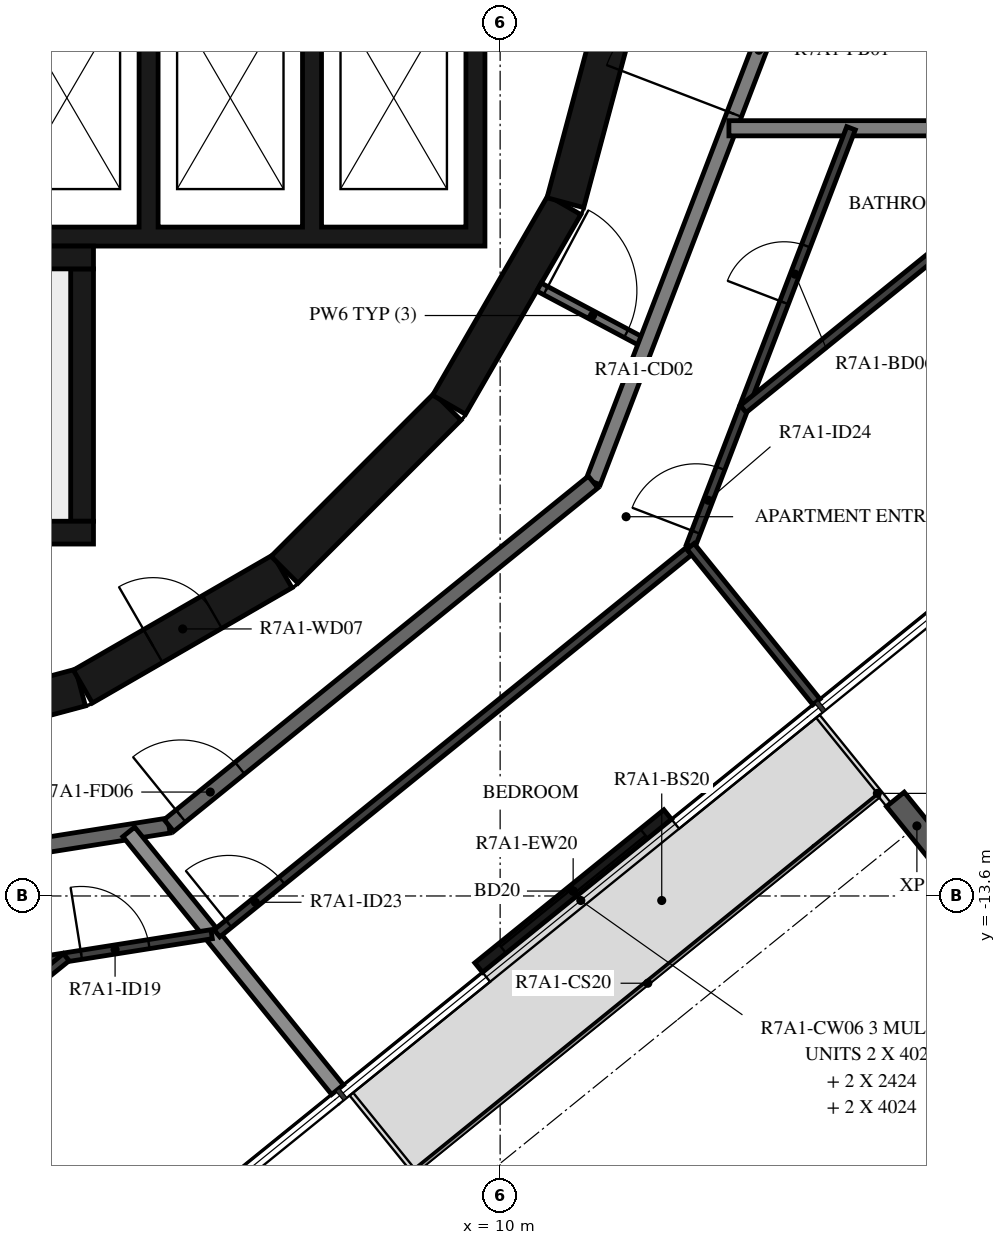
"""IFC4 building model, lengths in metres.
Left out: names, types, materials, properties, quantities, classifications, styles, units other than length and angle.
Written with IfcOpenShell. Run it as: python <this file> out.ifc"""

import sys

from ifc_helpers import new_model, si_unit, direction, frame, frame_2d, origin, origin_2d, place, context, subcontext, project, spatial, polyline, rectangle, i_section, outline, extrude, element, fill, save


model = new_model("IFC4")
c1 = context("Model", 3, precision=1e-05, world=origin(), true_north=direction((0.0, 1.0)))
c2 = subcontext(c1, "Body", "Model", "MODEL_VIEW")
j1 = project(units=[si_unit("LENGTHUNIT", "METRE"), si_unit("PLANEANGLEUNIT", "RADIAN")], contexts=[c1])
p1 = place(None, origin())
s1 = spatial("IfcSite", under=j1, at=p1, CompositionType="ELEMENT")
p2 = place(p1, origin())
s2 = spatial("IfcBuilding", under=s1, at=p2, CompositionType="ELEMENT")
p3 = place(p2, frame((0.0, 0.0, 266.9)))
s3 = spatial("IfcBuildingStorey", under=s2, at=p3, CompositionType="ELEMENT", Elevation=266.9)
p4 = place(p3, frame((15.483, -12.678, -0.38), z_axis=(0.0, 0.0, 1.0), x_axis=(-0.777146167973, -0.629320136024, 0.0)))
e1 = element("IfcColumn", 1, at=p4, inside=s3, PredefinedType="COLUMN", context=c2, shape_type="SweptSolid", body=[
    extrude(i_section(OverallWidth=0.3, OverallDepth=0.9, WebThickness=0.019, FlangeThickness=0.035, FilletRadius=0.03, at=origin_2d()), origin(), (0.0, 0.0, 1.0), 3.5),
])
p5 = place(p3, frame((9.717, -14.542, 0.0), z_axis=(0.0, 0.0, 1.0), x_axis=(0.777125818, 0.629345265333, 0.0)))
e2 = element("IfcWall", 2, at=p5, inside=s3, PredefinedType="STANDARD", context=c2, shape_type="SweptSolid", body=[
    extrude(rectangle(XDim=3.2, YDim=0.16, at=frame_2d((1.6, 0.0))), origin(), (0.0, 0.0, 1.0), 3.12),
])
p6 = place(p5, frame((0.4, 0.0, 0.0)))
e3 = element("IfcOpeningElement", 3, at=p6, cuts=e2, PredefinedType="OPENING", context=c2, shape_type="SweptSolid", body=[
    extrude(rectangle(XDim=2.4, YDim=2.4, at=frame_2d((1.2, 1.2))), frame((0.0, 0.09, 0.0), z_axis=(0.0, -1.0, 0.0), x_axis=(1.0, 0.0, 0.0)), (0.0, 0.0, 1.0), 0.18),
])
p7 = place(p3, frame((1.55, -11.643, 0.0), z_axis=(0.0, 0.0, 1.0), x_axis=(0.965948410781, 0.258734743916, 0.0)))
e4 = element("IfcWall", 4, at=p7, inside=s3, PredefinedType="SHEAR", context=c2, shape_type="SweptSolid", body=[
    extrude(rectangle(XDim=3.033, YDim=0.5, at=frame_2d((1.516, 0.0))), origin(), (0.0, 0.0, 1.0), 3.12),
])
p8 = place(p3, frame((4.51, -10.845, 0.0), z_axis=(0.0, 0.0, 1.0), x_axis=(0.865975092491, 0.500087131594, 0.0)))
e5 = element("IfcWall", 5, at=p8, inside=s3, PredefinedType="SHEAR", context=c2, shape_type="SweptSolid", body=[
    extrude(rectangle(XDim=3.033, YDim=0.5, at=frame_2d((1.516, 0.0))), origin(), (0.0, 0.0, 1.0), 3.12),
])
p9 = place(p8, frame((1.066, 0.0, 0.0)))
e6 = element("IfcOpeningElement", 6, at=p9, cuts=e5, PredefinedType="OPENING", context=c2, shape_type="SweptSolid", body=[
    extrude(rectangle(XDim=0.9, YDim=2.1, at=frame_2d((0.45, 1.05))), frame((0.0, 0.26, 0.0), z_axis=(0.0, -1.0, 0.0), x_axis=(1.0, 0.0, 0.0)), (0.0, 0.0, 1.0), 0.52),
])
p10 = place(p3, frame((7.164, -9.308, 0.0), z_axis=(0.0, 0.0, 1.0), x_axis=(0.707106781187, 0.707106781187, 0.0)))
e7 = element("IfcWall", 7, at=p10, inside=s3, PredefinedType="SHEAR", context=c2, shape_type="SweptSolid", body=[
    extrude(rectangle(XDim=3.032, YDim=0.5, at=frame_2d((1.516, 0.0))), origin(), (0.0, 0.0, 1.0), 3.12),
])
for number, where, z_axis, x_axis in (
    (8, (9.329, -7.137, 0.0), (0.0, 0.0, 1.0), (0.5, 0.866, 0.0)),
    (9, (10.858, -4.479, 0.0), (0.0, 0.0, 1.0), (0.259, 0.966, 0.0)),
):
    element("IfcWall", number, at=place(p3, frame(where, z_axis=z_axis, x_axis=x_axis)), inside=s3, PredefinedType="SHEAR", context=c2, shape_type="SweptSolid", body=[
        extrude(rectangle(XDim=3.033, YDim=0.5, at=frame_2d((1.516, 0.0))), origin(), (0.0, 0.0, 1.0), 3.12),
    ])
p11 = place(p3, frame((-2.4, -5.2, 0.0), z_axis=(0.0, 0.0, 1.0), x_axis=(1.0, 0.0, 0.0)))
e10 = element("IfcWall", 10, at=p11, inside=s3, PredefinedType="SHEAR", context=c2, shape_type="SweptSolid", body=[
    extrude(rectangle(XDim=7.05, YDim=0.3, at=frame_2d((3.525, 0.0))), origin(), (0.0, 0.0, 1.0), 3.12),
])
p12 = place(p3, frame((4.5, -8.67, 0.0), z_axis=(0.0, 0.0, 1.0), x_axis=(0.0, 1.0, 0.0)))
e11 = element("IfcWall", 11, at=p12, inside=s3, PredefinedType="SHEAR", context=c2, shape_type="SweptSolid", body=[
    extrude(rectangle(XDim=3.32, YDim=0.3, at=frame_2d((1.66, 0.0))), origin(), (0.0, 0.0, 1.0), 3.12),
])
p13 = place(p3, frame((0.1, -8.82, 0.0), z_axis=(0.0, 0.0, 1.0), x_axis=(1.0, 0.0, 0.0)))
e12 = element("IfcWall", 12, at=p13, inside=s3, PredefinedType="SHEAR", context=c2, shape_type="SweptSolid", body=[
    extrude(rectangle(XDim=4.55, YDim=0.3, at=frame_2d((2.275, 0.0))), origin(), (0.0, 0.0, 1.0), 3.12),
])
p14 = place(p3, origin())
e13 = element("IfcWall", 13, at=p14, inside=s3, PredefinedType="SHEAR", context=c2, shape_type="SweptSolid", body=[
    extrude(outline(polyline([(9.8, -5.05), (9.8, -4.8), (9.8, -1.9), (9.55, -1.9), (9.55, -4.8), (7.65, -4.8), (7.65, -1.9), (7.4, -1.9), (7.4, -4.8), (5.5, -4.8), (5.5, -1.9), (5.25, -1.9), (5.25, -4.8), (3.35, -4.8), (3.35, -1.9), (3.1, -1.9), (3.1, -4.8), (1.2, -4.8), (1.2, -1.9), (0.95, -1.9), (0.95, -4.8), (-0.95, -4.8), (-0.95, -1.9), (-1.2, -1.9), (-1.2, -4.8), (-3.1, -4.8), (-3.1, -1.9), (-3.35, -1.9), (-3.35, -4.8), (-5.25, -4.8), (-5.25, -1.9), (-5.5, -1.9), (-5.5, -4.8), (-7.4, -4.8), (-7.4, -1.9), (-7.65, -1.9), (-7.65, -4.8), (-9.55, -4.8), (-9.55, -1.9), (-9.8, -1.9), (-9.8, -4.8), (-9.8, -5.05), (9.8, -5.05)])), origin(), (0.0, 0.0, 1.0), 3.12),
])
p15 = place(p3, frame((10.511, -5.589, 0.0), z_axis=(0.0, 0.0, 1.0), x_axis=(0.882983002821, -0.469404960273, 0.0)))
e14 = element("IfcWall", 14, at=p15, inside=s3, PredefinedType="PARTITIONING", context=c2, shape_type="SweptSolid", body=[
    extrude(rectangle(XDim=1.596, YDim=0.12, at=frame_2d((0.798, 0.0))), origin(), (0.0, 0.0, 1.0), 3.12),
])
p16 = place(p15, frame((0.1, 0.0, 0.0)))
e15 = element("IfcOpeningElement", 15, at=p16, cuts=e14, PredefinedType="OPENING", context=c2, shape_type="SweptSolid", body=[
    extrude(rectangle(XDim=1.2, YDim=2.1, at=frame_2d((0.6, 1.05))), frame((0.0, 0.07, 0.0), z_axis=(0.0, -1.0, 0.0), x_axis=(1.0, 0.0, 0.0)), (0.0, 0.0, 1.0), 0.14),
])
p17 = place(p3, frame((11.223, -8.154, 0.0), z_axis=(0.0, 0.0, 1.0), x_axis=(0.358341090983, 0.93359073609, 0.0)))
e16 = element("IfcWall", 16, at=p17, inside=s3, PredefinedType="STANDARD", context=c2, shape_type="SweptSolid", body=[
    extrude(rectangle(XDim=7.181, YDim=0.2, at=frame_2d((3.59, 0.0))), origin(), (0.0, 0.0, 1.0), 3.12),
])
p18 = place(p17, frame((5.185, 0.0, 0.0)))
e17 = element("IfcOpeningElement", 17, at=p18, cuts=e16, PredefinedType="OPENING", context=c2, shape_type="SweptSolid", body=[
    extrude(rectangle(XDim=1.8, YDim=2.1, at=frame_2d((0.9, 1.05))), frame((0.0, 0.11, 0.0), z_axis=(0.0, -1.0, 0.0), x_axis=(1.0, 0.0, 0.0)), (0.0, 0.0, 1.0), 0.22),
])
p19 = place(p3, frame((-1.45, -13.797, 0.0), z_axis=(0.0, 0.0, 1.0), x_axis=(0.987690361611, 0.156421704315, 0.0)))
e18 = element("IfcWall", 18, at=p19, inside=s3, PredefinedType="STANDARD", context=c2, shape_type="SweptSolid", body=[
    extrude(rectangle(XDim=7.181, YDim=0.2, at=frame_2d((3.591, 0.0))), origin(), (0.0, 0.0, 1.0), 3.12),
])
p20 = place(p19, frame((0.2, 0.0, 0.0)))
e19 = element("IfcOpeningElement", 19, at=p20, cuts=e18, PredefinedType="OPENING", context=c2, shape_type="SweptSolid", body=[
    extrude(rectangle(XDim=1.0, YDim=2.1, at=frame_2d((0.5, 1.05))), frame((0.0, 0.11, 0.0), z_axis=(0.0, -1.0, 0.0), x_axis=(1.0, 0.0, 0.0)), (0.0, 0.0, 1.0), 0.22),
])
p21 = place(p3, frame((5.643, -12.673, 0.0), z_axis=(0.0, 0.0, 1.0), x_axis=(0.777160148113, 0.629302871585, 0.0)))
e20 = element("IfcWall", 20, at=p21, inside=s3, PredefinedType="STANDARD", context=c2, shape_type="SweptSolid", body=[
    extrude(rectangle(XDim=7.181, YDim=0.2, at=frame_2d((3.59, 0.0))), origin(), (0.0, 0.0, 1.0), 3.12),
])
p22 = place(p21, frame((0.2, 0.0, 0.0)))
e21 = element("IfcOpeningElement", 21, at=p22, cuts=e20, PredefinedType="OPENING", context=c2, shape_type="SweptSolid", body=[
    extrude(rectangle(XDim=1.0, YDim=2.1, at=frame_2d((0.5, 1.05))), frame((0.0, 0.11, 0.0), z_axis=(0.0, -1.0, 0.0), x_axis=(1.0, 0.0, 0.0)), (0.0, 0.0, 1.0), 0.22),
])
p23 = place(p3, frame((13.01, -3.5, 0.0), z_axis=(0.0, 0.0, 1.0), x_axis=(1.0, 0.0, 0.0)))
e22 = element("IfcWall", 22, at=p23, inside=s3, PredefinedType="STANDARD", context=c2, shape_type="SweptSolid", body=[
    extrude(rectangle(XDim=4.75, YDim=0.2, at=frame_2d((2.375, 0.0))), origin(), (0.0, 0.0, 1.0), 3.12),
])
p24 = place(p3, frame((7.861, -16.148, 0.0), z_axis=(0.0, 0.0, 1.0), x_axis=(-0.629330189513, 0.777138026716, 0.0)))
e23 = element("IfcWall", 23, at=p24, inside=s3, PredefinedType="STANDARD", context=c2, shape_type="SweptSolid", body=[
    extrude(rectangle(XDim=4.364, YDim=0.2, at=frame_2d((2.182, 0.0))), origin(), (0.0, 0.0, 1.0), 2.73),
])
p25 = place(p3, frame((-1.318, -15.294, 0.0), z_axis=(0.0, 0.0, 1.0), x_axis=(0.987689040792, 0.156430044108, 0.0)))
e24 = element("IfcWall", 24, at=p25, inside=s3, PredefinedType="PARTITIONING", context=c2, shape_type="SweptSolid", body=[
    extrude(rectangle(XDim=7.616, YDim=0.12, at=frame_2d((3.808, 0.0))), origin(), (0.0, 0.0, 1.0), 3.12),
])
p26 = place(p25, frame((0.4, 0.0, 0.0)))
e25 = element("IfcOpeningElement", 25, at=p26, cuts=e24, PredefinedType="OPENING", context=c2, shape_type="SweptSolid", body=[
    extrude(rectangle(XDim=0.8, YDim=2.1, at=frame_2d((0.4, 1.05))), frame((0.0, 0.07, 0.0), z_axis=(0.0, -1.0, 0.0), x_axis=(1.0, 0.0, 0.0)), (0.0, 0.0, 1.0), 0.14),
])
p27 = place(p25, frame((5.88, 0.0, 0.0)))
e26 = element("IfcOpeningElement", 26, at=p27, cuts=e24, PredefinedType="OPENING", context=c2, shape_type="SweptSolid", body=[
    extrude(rectangle(XDim=0.9, YDim=2.1, at=frame_2d((0.45, 1.05))), frame((0.0, 0.07, 0.0), z_axis=(0.0, -1.0, 0.0), x_axis=(1.0, 0.0, 0.0)), (0.0, 0.0, 1.0), 0.14),
])
p28 = place(p3, frame((-3.875, -21.019, 0.0), z_axis=(0.0, 0.0, 1.0), x_axis=(0.777149096542, 0.629316519523, 0.0)))
e27 = element("IfcWall", 27, at=p28, inside=s3, PredefinedType="PARTITIONING", context=c2, shape_type="SweptSolid", body=[
    extrude(rectangle(XDim=10.508, YDim=0.12, at=frame_2d((5.254, 0.0))), origin(), (0.0, 0.0, 1.0), 3.12),
])
p29 = place(p28, frame((1.23, 0.0, 0.0)))
e28 = element("IfcOpeningElement", 28, at=p29, cuts=e27, PredefinedType="OPENING", context=c2, shape_type="SweptSolid", body=[
    extrude(rectangle(XDim=0.9, YDim=2.1, at=frame_2d((0.45, 1.05))), frame((0.0, 0.07, 0.0), z_axis=(0.0, -1.0, 0.0), x_axis=(1.0, 0.0, 0.0)), (0.0, 0.0, 1.0), 0.14),
])
p30 = place(p3, frame((6.274, -14.092, 0.0), z_axis=(0.0, 0.0, 1.0), x_axis=(0.777135206268, 0.62933367237, 0.0)))
e29 = element("IfcWall", 29, at=p30, inside=s3, PredefinedType="PARTITIONING", context=c2, shape_type="SweptSolid", body=[
    extrude(rectangle(XDim=7.985, YDim=0.12, at=frame_2d((3.992, 0.0))), origin(), (0.0, 0.0, 1.0), 3.12),
])
p31 = place(p30, frame((0.2, 0.0, 0.0)))
e30 = element("IfcOpeningElement", 30, at=p31, cuts=e29, PredefinedType="OPENING", context=c2, shape_type="SweptSolid", body=[
    extrude(rectangle(XDim=0.9, YDim=2.1, at=frame_2d((0.45, 1.05))), frame((0.0, 0.07, 0.0), z_axis=(0.0, -1.0, 0.0), x_axis=(1.0, 0.0, 0.0)), (0.0, 0.0, 1.0), 0.14),
])
p32 = place(p3, frame((12.505, -9.001, 0.0), z_axis=(0.0, 0.0, 1.0), x_axis=(0.358373707046, 0.933578216379, 0.0)))
e31 = element("IfcWall", 31, at=p32, inside=s3, PredefinedType="PARTITIONING", context=c2, shape_type="SweptSolid", body=[
    extrude(rectangle(XDim=5.892, YDim=0.12, at=frame_2d((2.946, 0.0))), origin(), (0.0, 0.0, 1.0), 3.12),
])
p33 = place(p32, frame((0.2, 0.0, 0.0)))
e32 = element("IfcOpeningElement", 32, at=p33, cuts=e31, PredefinedType="OPENING", context=c2, shape_type="SweptSolid", body=[
    extrude(rectangle(XDim=0.9, YDim=2.1, at=frame_2d((0.45, 1.05))), frame((0.0, 0.07, 0.0), z_axis=(0.0, -1.0, 0.0), x_axis=(1.0, 0.0, 0.0)), (0.0, 0.0, 1.0), 0.14),
])
p34 = place(p32, frame((3.436, 0.0, 0.0)))
e33 = element("IfcOpeningElement", 33, at=p34, cuts=e31, PredefinedType="OPENING", context=c2, shape_type="SweptSolid", body=[
    extrude(rectangle(XDim=0.8, YDim=2.1, at=frame_2d((0.4, 1.05))), frame((0.0, 0.07, 0.0), z_axis=(0.0, -1.0, 0.0), x_axis=(1.0, 0.0, 0.0)), (0.0, 0.0, 1.0), 0.14),
])
p35 = place(p3, frame((14.161, -11.046, 0.0), z_axis=(0.0, 0.0, 1.0), x_axis=(-0.62931028473, 0.777154145284, 0.0)))
e34 = element("IfcWall", 34, at=p35, inside=s3, PredefinedType="PARTITIONING", context=c2, shape_type="SweptSolid", body=[
    extrude(rectangle(XDim=2.632, YDim=0.12, at=frame_2d((1.316, 0.0))), origin(), (0.0, 0.0, 1.0), 2.73),
])
p36 = place(p3, frame((17.76, -3.5, 0.0), z_axis=(0.0, 0.0, 1.0), x_axis=(-0.777133455716, -0.62933583404, 0.0)))
e35 = element("IfcWall", 35, at=p36, inside=s3, PredefinedType="PARTITIONING", context=c2, shape_type="SweptSolid", body=[
    extrude(rectangle(XDim=5.869, YDim=0.12, at=frame_2d((2.935, 0.0))), origin(), (0.0, 0.0, 1.0), 3.12),
])
p37 = place(p6, origin())
e36 = element("IfcDoor", 36, at=p37, inside=s3, OperationType="DOUBLE_DOOR_SLIDING", PredefinedType="DOOR", context=c2, shape_type="SweptSolid", body=[
    extrude(rectangle(XDim=2.4, YDim=2.4, at=frame_2d((1.2, 1.2))), frame((0.0, 0.025, 0.0), z_axis=(0.0, -1.0, 0.0), x_axis=(1.0, 0.0, 0.0)), (0.0, 0.0, 1.0), 0.05),
])
fill(e3, e36)
p38 = place(p9, origin())
e37 = element("IfcDoor", 37, at=p38, inside=s3, OperationType="SINGLE_SWING_LEFT", PredefinedType="DOOR", context=c2, shape_type="SweptSolid", body=[
    extrude(rectangle(XDim=0.9, YDim=2.1, at=frame_2d((0.45, 1.05))), frame((0.0, 0.025, 0.0), z_axis=(0.0, -1.0, 0.0), x_axis=(1.0, 0.0, 0.0)), (0.0, 0.0, 1.0), 0.05),
])
fill(e6, e37)
p39 = place(p27, origin())
e38 = element("IfcDoor", 38, at=p39, inside=s3, OperationType="SINGLE_SWING_LEFT", PredefinedType="DOOR", context=c2, shape_type="SweptSolid", body=[
    extrude(rectangle(XDim=0.9, YDim=2.1, at=frame_2d((0.45, 1.05))), frame((0.0, 0.025, 0.0), z_axis=(0.0, -1.0, 0.0), x_axis=(1.0, 0.0, 0.0)), (0.0, 0.0, 1.0), 0.05),
])
fill(e26, e38)
p40 = place(p22, origin())
e39 = element("IfcDoor", 39, at=p40, inside=s3, OperationType="SINGLE_SWING_LEFT", PredefinedType="DOOR", context=c2, shape_type="SweptSolid", body=[
    extrude(rectangle(XDim=1.0, YDim=2.1, at=frame_2d((0.5, 1.05))), frame((0.0, 0.025, 0.0), z_axis=(0.0, -1.0, 0.0), x_axis=(1.0, 0.0, 0.0)), (0.0, 0.0, 1.0), 0.05),
])
fill(e21, e39)
p41 = place(p31, origin())
e40 = element("IfcDoor", 40, at=p41, inside=s3, OperationType="SINGLE_SWING_LEFT", PredefinedType="DOOR", context=c2, shape_type="SweptSolid", body=[
    extrude(rectangle(XDim=0.9, YDim=2.1, at=frame_2d((0.45, 1.05))), frame((0.0, 0.025, 0.0), z_axis=(0.0, -1.0, 0.0), x_axis=(1.0, 0.0, 0.0)), (0.0, 0.0, 1.0), 0.05),
])
fill(e30, e40)
p42 = place(p33, origin())
e41 = element("IfcDoor", 41, at=p42, inside=s3, OperationType="SINGLE_SWING_RIGHT", PredefinedType="DOOR", context=c2, shape_type="SweptSolid", body=[
    extrude(rectangle(XDim=0.9, YDim=2.1, at=frame_2d((0.45, 1.05))), frame((0.0, 0.025, 0.0), z_axis=(0.0, -1.0, 0.0), x_axis=(1.0, 0.0, 0.0)), (0.0, 0.0, 1.0), 0.05),
])
fill(e32, e41)
p43 = place(p34, origin())
e42 = element("IfcDoor", 42, at=p43, inside=s3, OperationType="SINGLE_SWING_RIGHT", PredefinedType="DOOR", context=c2, shape_type="SweptSolid", body=[
    extrude(rectangle(XDim=0.8, YDim=2.1, at=frame_2d((0.4, 1.05))), frame((0.0, 0.025, 0.0), z_axis=(0.0, -1.0, 0.0), x_axis=(1.0, 0.0, 0.0)), (0.0, 0.0, 1.0), 0.05),
])
fill(e33, e42)
p44 = place(p16, origin())
e43 = element("IfcDoor", 43, at=p44, inside=s3, OperationType="DOUBLE_DOOR_SINGLE_SWING", PredefinedType="DOOR", context=c2, shape_type="SweptSolid", body=[
    extrude(rectangle(XDim=1.2, YDim=2.1, at=frame_2d((0.6, 1.05))), frame((0.0, 0.025, 0.0), z_axis=(0.0, -1.0, 0.0), x_axis=(1.0, 0.0, 0.0)), (0.0, 0.0, 1.0), 0.05),
])
fill(e15, e43)
p45 = place(p18, origin())
e44 = element("IfcDoor", 44, at=p45, inside=s3, OperationType="DOUBLE_DOOR_SINGLE_SWING", PredefinedType="DOOR", context=c2, shape_type="SweptSolid", body=[
    extrude(rectangle(XDim=1.8, YDim=2.1, at=frame_2d((0.9, 1.05))), frame((0.0, 0.025, 0.0), z_axis=(0.0, -1.0, 0.0), x_axis=(1.0, 0.0, 0.0)), (0.0, 0.0, 1.0), 0.05),
])
fill(e17, e44)
save(model, sys.argv[1])
